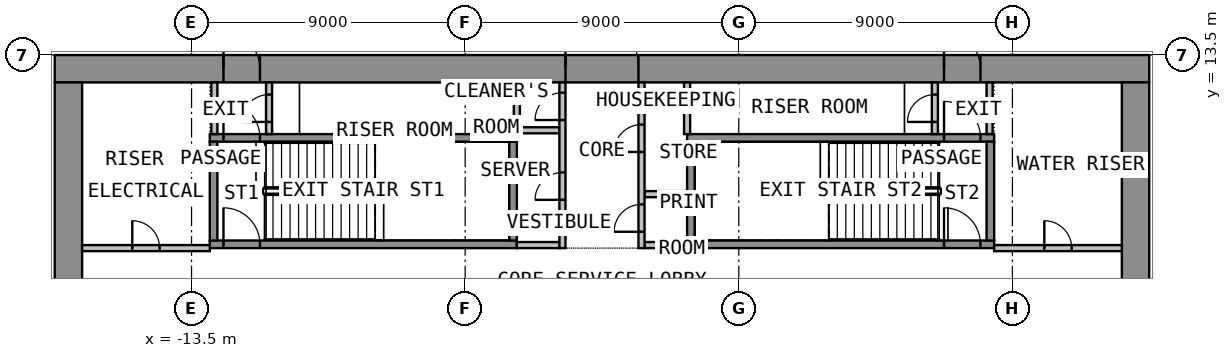
"""IFC4 building model, lengths in metres.
Left out: names, types, materials, properties, quantities, classifications, styles, units other than length and angle.
Written with IfcOpenShell. Run it as: python <this file> out.ifc"""

import sys

from ifc_helpers import new_model, si_unit, direction, frame, frame_2d, origin, place, context, subcontext, project, spatial, rectangle, extrude, element, fill, save


model = new_model("IFC4")
c1 = context("Model", 3, precision=1e-05, world=origin(), true_north=direction((0.0, 1.0)))
c2 = subcontext(c1, "Body", "Model", "MODEL_VIEW")
j1 = project(units=[si_unit("LENGTHUNIT", "METRE"), si_unit("PLANEANGLEUNIT", "RADIAN")], contexts=[c1])
p1 = place(None, origin())
s1 = spatial("IfcSite", under=j1, at=p1, CompositionType="ELEMENT")
p2 = place(p1, origin())
s2 = spatial("IfcBuilding", under=s1, at=p2, CompositionType="ELEMENT")
p3 = place(p2, frame((0.0, 0.0, 10.8)))
s3 = spatial("IfcBuildingStorey", under=s2, at=p3, CompositionType="ELEMENT", Elevation=10.8)
p4 = place(p3, frame((-18.0, 13.05, 0.0), z_axis=(0.0, 0.0, 1.0), x_axis=(1.0, 0.0, 0.0)))
e1 = element("IfcWall", 1, at=p4, inside=s3, PredefinedType="SHEAR", context=c2, shape_type="SweptSolid", body=[
    extrude(rectangle(XDim=36.0, YDim=0.9, at=frame_2d((18.0, 0.0))), origin(), (0.0, 0.0, 1.0), 4.4),
])
p5 = place(p4, frame((16.8, 0.0, 0.0)))
e2 = element("IfcOpeningElement", 2, at=p5, cuts=e1, PredefinedType="OPENING", context=c2, shape_type="SweptSolid", body=[
    extrude(rectangle(XDim=2.4, YDim=2.1, at=frame_2d((1.2, 1.05))), frame((0.0, 0.46, 0.0), z_axis=(0.0, -1.0, 0.0), x_axis=(1.0, 0.0, 0.0)), (0.0, 0.0, 1.0), 0.92),
])
p6 = place(p4, frame((5.55, 0.0, 0.0)))
e3 = element("IfcOpeningElement", 3, at=p6, cuts=e1, PredefinedType="OPENING", context=c2, shape_type="SweptSolid", body=[
    extrude(rectangle(XDim=1.2, YDim=2.1, at=frame_2d((0.6, 1.05))), frame((0.0, 0.46, 0.0), z_axis=(0.0, -1.0, 0.0), x_axis=(1.0, 0.0, 0.0)), (0.0, 0.0, 1.0), 0.92),
])
p7 = place(p4, frame((29.25, 0.0, 0.0)))
e4 = element("IfcOpeningElement", 4, at=p7, cuts=e1, PredefinedType="OPENING", context=c2, shape_type="SweptSolid", body=[
    extrude(rectangle(XDim=1.2, YDim=2.1, at=frame_2d((0.6, 1.05))), frame((0.0, 0.46, 0.0), z_axis=(0.0, -1.0, 0.0), x_axis=(1.0, 0.0, 0.0)), (0.0, 0.0, 1.0), 0.92),
])
p8 = place(p3, frame((-17.55, -12.6, 0.0), z_axis=(0.0, 0.0, 1.0), x_axis=(0.0, 1.0, 0.0)))
e5 = element("IfcWall", 5, at=p8, inside=s3, PredefinedType="SHEAR", context=c2, shape_type="SweptSolid", body=[
    extrude(rectangle(XDim=25.2, YDim=0.9, at=frame_2d((12.6, 0.0))), origin(), (0.0, 0.0, 1.0), 4.4),
])
p9 = place(p8, frame((11.4, 0.0, 0.0)))
e6 = element("IfcOpeningElement", 6, at=p9, cuts=e5, PredefinedType="OPENING", context=c2, shape_type="SweptSolid", body=[
    extrude(rectangle(XDim=2.4, YDim=2.1, at=frame_2d((1.2, 1.05))), frame((0.0, 0.46, 0.0), z_axis=(0.0, -1.0, 0.0), x_axis=(1.0, 0.0, 0.0)), (0.0, 0.0, 1.0), 0.92),
])
p10 = place(p3, frame((17.55, -12.6, 0.0), z_axis=(0.0, 0.0, 1.0), x_axis=(0.0, 1.0, 0.0)))
e7 = element("IfcWall", 7, at=p10, inside=s3, PredefinedType="SHEAR", context=c2, shape_type="SweptSolid", body=[
    extrude(rectangle(XDim=25.2, YDim=0.9, at=frame_2d((12.6, 0.0))), origin(), (0.0, 0.0, 1.0), 4.4),
])
p11 = place(p10, frame((11.4, 0.0, 0.0)))
e8 = element("IfcOpeningElement", 8, at=p11, cuts=e7, PredefinedType="OPENING", context=c2, shape_type="SweptSolid", body=[
    extrude(rectangle(XDim=2.4, YDim=2.1, at=frame_2d((1.2, 1.05))), frame((0.0, 0.46, 0.0), z_axis=(0.0, -1.0, 0.0), x_axis=(1.0, 0.0, 0.0)), (0.0, 0.0, 1.0), 0.92),
])
p12 = place(p3, frame((-12.9, 7.275, 0.0), z_axis=(0.0, 0.0, 1.0), x_axis=(1.0, 0.0, 0.0)))
e9 = element("IfcWall", 9, at=p12, inside=s3, PredefinedType="SHEAR", context=c2, shape_type="SweptSolid", body=[
    extrude(rectangle(XDim=10.1, YDim=0.25, at=frame_2d((5.05, 0.0))), origin(), (0.0, 0.0, 1.0), 4.4),
])
p13 = place(p12, frame((0.45, 0.0, 0.0)))
e10 = element("IfcOpeningElement", 10, at=p13, cuts=e9, PredefinedType="OPENING", context=c2, shape_type="SweptSolid", body=[
    extrude(rectangle(XDim=1.2, YDim=2.1, at=frame_2d((0.6, 1.05))), frame((0.0, 0.135, 0.0), z_axis=(0.0, -1.0, 0.0), x_axis=(1.0, 0.0, 0.0)), (0.0, 0.0, 1.0), 0.27),
])
p14 = place(p3, frame((-12.9, 10.775, 0.0), z_axis=(0.0, 0.0, 1.0), x_axis=(1.0, 0.0, 0.0)))
e11 = element("IfcWall", 11, at=p14, inside=s3, PredefinedType="SHEAR", context=c2, shape_type="SweptSolid", body=[
    extrude(rectangle(XDim=10.1, YDim=0.25, at=frame_2d((5.05, 0.0))), origin(), (0.0, 0.0, 1.0), 4.4),
])
p15 = place(p14, frame((0.45, 0.0, 0.0)))
e12 = element("IfcOpeningElement", 12, at=p15, cuts=e11, PredefinedType="OPENING", context=c2, shape_type="SweptSolid", body=[
    extrude(rectangle(XDim=1.2, YDim=2.1, at=frame_2d((0.6, 1.05))), frame((0.0, 0.135, 0.0), z_axis=(0.0, -1.0, 0.0), x_axis=(1.0, 0.0, 0.0)), (0.0, 0.0, 1.0), 0.27),
])
for number, where, z_axis, x_axis in (
    (13, (-12.775, 7.4, 0.0), (0.0, 0.0, 1.0), (0.0, 1.0, 0.0)),
    (14, (-2.925, 7.4, 0.0), (0.0, 0.0, 1.0), (0.0, 1.0, 0.0)),
):
    element("IfcWall", number, at=place(p3, frame(where, z_axis=z_axis, x_axis=x_axis)), inside=s3, PredefinedType="SHEAR", context=c2, shape_type="SweptSolid", body=[
        extrude(rectangle(XDim=3.25, YDim=0.25, at=frame_2d((1.625, 0.0))), origin(), (0.0, 0.0, 1.0), 4.4),
    ])
p16 = place(p3, frame((2.8, 7.275, 0.0), z_axis=(0.0, 0.0, 1.0), x_axis=(1.0, 0.0, 0.0)))
e15 = element("IfcWall", 15, at=p16, inside=s3, PredefinedType="SHEAR", context=c2, shape_type="SweptSolid", body=[
    extrude(rectangle(XDim=10.1, YDim=0.25, at=frame_2d((5.05, 0.0))), origin(), (0.0, 0.0, 1.0), 4.4),
])
p17 = place(p16, frame((8.45, 0.0, 0.0)))
e16 = element("IfcOpeningElement", 16, at=p17, cuts=e15, PredefinedType="OPENING", context=c2, shape_type="SweptSolid", body=[
    extrude(rectangle(XDim=1.2, YDim=2.1, at=frame_2d((0.6, 1.05))), frame((0.0, 0.135, 0.0), z_axis=(0.0, -1.0, 0.0), x_axis=(1.0, 0.0, 0.0)), (0.0, 0.0, 1.0), 0.27),
])
p18 = place(p3, frame((2.8, 10.775, 0.0), z_axis=(0.0, 0.0, 1.0), x_axis=(1.0, 0.0, 0.0)))
e17 = element("IfcWall", 17, at=p18, inside=s3, PredefinedType="SHEAR", context=c2, shape_type="SweptSolid", body=[
    extrude(rectangle(XDim=10.1, YDim=0.25, at=frame_2d((5.05, 0.0))), origin(), (0.0, 0.0, 1.0), 4.4),
])
p19 = place(p18, frame((8.45, 0.0, 0.0)))
e18 = element("IfcOpeningElement", 18, at=p19, cuts=e17, PredefinedType="OPENING", context=c2, shape_type="SweptSolid", body=[
    extrude(rectangle(XDim=1.2, YDim=2.1, at=frame_2d((0.6, 1.05))), frame((0.0, 0.135, 0.0), z_axis=(0.0, -1.0, 0.0), x_axis=(1.0, 0.0, 0.0)), (0.0, 0.0, 1.0), 0.27),
])
for number, where, z_axis, x_axis in (
    (19, (2.925, 7.4, 0.0), (0.0, 0.0, 1.0), (0.0, 1.0, 0.0)),
    (20, (12.775, 7.4, 0.0), (0.0, 0.0, 1.0), (0.0, 1.0, 0.0)),
):
    element("IfcWall", number, at=place(p3, frame(where, z_axis=z_axis, x_axis=x_axis)), inside=s3, PredefinedType="SHEAR", context=c2, shape_type="SweptSolid", body=[
        extrude(rectangle(XDim=3.25, YDim=0.25, at=frame_2d((1.625, 0.0))), origin(), (0.0, 0.0, 1.0), 4.4),
    ])
for number, where, z_axis, x_axis in (
    (21, (-2.8, 7.25, 0.0), (0.0, 0.0, 1.0), (1.0, 0.0, 0.0)),
    (22, (-2.8, 11.025, 0.0), (0.0, 0.0, 1.0), (1.0, 0.0, 0.0)),
    (23, (1.4, 7.25, 0.0), (0.0, 0.0, 1.0), (1.0, 0.0, 0.0)),
    (24, (1.4, 8.925, 0.0), (0.0, 0.0, 1.0), (1.0, 0.0, 0.0)),
):
    element("IfcWall", number, at=place(p3, frame(where, z_axis=z_axis, x_axis=x_axis)), inside=s3, PredefinedType="PARTITIONING", context=c2, shape_type="SweptSolid", body=[
        extrude(rectangle(XDim=1.4, YDim=0.2, at=frame_2d((0.7, 0.0))), origin(), (0.0, 0.0, 1.0), 4.4),
    ])
p20 = place(p3, frame((-1.3, 7.15, 0.0), z_axis=(0.0, 0.0, 1.0), x_axis=(0.0, 1.0, 0.0)))
e25 = element("IfcWall", 25, at=p20, inside=s3, PredefinedType="PARTITIONING", context=c2, shape_type="SweptSolid", body=[
    extrude(rectangle(XDim=5.45, YDim=0.2, at=frame_2d((2.725, 0.0))), origin(), (0.0, 0.0, 1.0), 4.4),
])
p21 = place(p20, frame((1.587, 0.0, 0.0)))
e26 = element("IfcOpeningElement", 26, at=p21, cuts=e25, PredefinedType="OPENING", context=c2, shape_type="SweptSolid", body=[
    extrude(rectangle(XDim=0.9, YDim=2.1, at=frame_2d((0.45, 1.05))), frame((0.0, 0.11, 0.0), z_axis=(0.0, -1.0, 0.0), x_axis=(1.0, 0.0, 0.0)), (0.0, 0.0, 1.0), 0.22),
])
p22 = place(p20, frame((4.212, 0.0, 0.0)))
e27 = element("IfcOpeningElement", 27, at=p22, cuts=e25, PredefinedType="OPENING", context=c2, shape_type="SweptSolid", body=[
    extrude(rectangle(XDim=0.9, YDim=2.1, at=frame_2d((0.45, 1.05))), frame((0.0, 0.11, 0.0), z_axis=(0.0, -1.0, 0.0), x_axis=(1.0, 0.0, 0.0)), (0.0, 0.0, 1.0), 0.22),
])
p23 = place(p3, frame((1.3, 7.15, 0.0), z_axis=(0.0, 0.0, 1.0), x_axis=(0.0, 1.0, 0.0)))
e28 = element("IfcWall", 28, at=p23, inside=s3, PredefinedType="PARTITIONING", context=c2, shape_type="SweptSolid", body=[
    extrude(rectangle(XDim=5.45, YDim=0.2, at=frame_2d((2.725, 0.0))), origin(), (0.0, 0.0, 1.0), 4.4),
])
p24 = place(p23, frame((0.538, 0.0, 0.0)))
e29 = element("IfcOpeningElement", 29, at=p24, cuts=e28, PredefinedType="OPENING", context=c2, shape_type="SweptSolid", body=[
    extrude(rectangle(XDim=0.9, YDim=2.1, at=frame_2d((0.45, 1.05))), frame((0.0, 0.11, 0.0), z_axis=(0.0, -1.0, 0.0), x_axis=(1.0, 0.0, 0.0)), (0.0, 0.0, 1.0), 0.22),
])
p25 = place(p23, frame((3.163, 0.0, 0.0)))
e30 = element("IfcOpeningElement", 30, at=p25, cuts=e28, PredefinedType="OPENING", context=c2, shape_type="SweptSolid", body=[
    extrude(rectangle(XDim=0.9, YDim=2.1, at=frame_2d((0.45, 1.05))), frame((0.0, 0.11, 0.0), z_axis=(0.0, -1.0, 0.0), x_axis=(1.0, 0.0, 0.0)), (0.0, 0.0, 1.0), 0.22),
])
p26 = place(p3, frame((-12.75, 10.9, 0.0), z_axis=(0.0, 0.0, 1.0), x_axis=(0.0, 1.0, 0.0)))
e31 = element("IfcWall", 31, at=p26, inside=s3, PredefinedType="PARTITIONING", context=c2, shape_type="SweptSolid", body=[
    extrude(rectangle(XDim=1.7, YDim=0.2, at=frame_2d((0.85, 0.0))), origin(), (0.0, 0.0, 1.0), 4.4),
])
p27 = place(p3, frame((-10.95, 10.9, 0.0), z_axis=(0.0, 0.0, 1.0), x_axis=(0.0, 1.0, 0.0)))
e32 = element("IfcWall", 32, at=p27, inside=s3, PredefinedType="PARTITIONING", context=c2, shape_type="SweptSolid", body=[
    extrude(rectangle(XDim=1.7, YDim=0.2, at=frame_2d((0.85, 0.0))), origin(), (0.0, 0.0, 1.0), 4.4),
])
p28 = place(p27, frame((0.4, 0.0, 0.0)))
e33 = element("IfcOpeningElement", 33, at=p28, cuts=e32, PredefinedType="OPENING", context=c2, shape_type="SweptSolid", body=[
    extrude(rectangle(XDim=0.9, YDim=2.1, at=frame_2d((0.45, 1.05))), frame((0.0, 0.11, 0.0), z_axis=(0.0, -1.0, 0.0), x_axis=(1.0, 0.0, 0.0)), (0.0, 0.0, 1.0), 0.22),
])
p29 = place(p3, frame((12.75, 10.9, 0.0), z_axis=(0.0, 0.0, 1.0), x_axis=(0.0, 1.0, 0.0)))
e34 = element("IfcWall", 34, at=p29, inside=s3, PredefinedType="PARTITIONING", context=c2, shape_type="SweptSolid", body=[
    extrude(rectangle(XDim=1.7, YDim=0.2, at=frame_2d((0.85, 0.0))), origin(), (0.0, 0.0, 1.0), 4.4),
])
p30 = place(p3, frame((10.95, 10.9, 0.0), z_axis=(0.0, 0.0, 1.0), x_axis=(0.0, 1.0, 0.0)))
e35 = element("IfcWall", 35, at=p30, inside=s3, PredefinedType="PARTITIONING", context=c2, shape_type="SweptSolid", body=[
    extrude(rectangle(XDim=1.7, YDim=0.2, at=frame_2d((0.85, 0.0))), origin(), (0.0, 0.0, 1.0), 4.4),
])
p31 = place(p30, frame((0.4, 0.0, 0.0)))
e36 = element("IfcOpeningElement", 36, at=p31, cuts=e35, PredefinedType="OPENING", context=c2, shape_type="SweptSolid", body=[
    extrude(rectangle(XDim=0.9, YDim=2.1, at=frame_2d((0.45, 1.05))), frame((0.0, 0.11, 0.0), z_axis=(0.0, -1.0, 0.0), x_axis=(1.0, 0.0, 0.0)), (0.0, 0.0, 1.0), 0.22),
])
p32 = place(p3, frame((-17.1, 7.15, 0.0), z_axis=(0.0, 0.0, 1.0), x_axis=(1.0, 0.0, 0.0)))
e37 = element("IfcWall", 37, at=p32, inside=s3, PredefinedType="PARTITIONING", context=c2, shape_type="SweptSolid", body=[
    extrude(rectangle(XDim=4.2, YDim=0.2, at=frame_2d((2.1, 0.0))), origin(), (0.0, 0.0, 1.0), 4.4),
])
p33 = place(p32, frame((1.65, 0.0, 0.0)))
e38 = element("IfcOpeningElement", 38, at=p33, cuts=e37, PredefinedType="OPENING", context=c2, shape_type="SweptSolid", body=[
    extrude(rectangle(XDim=0.9, YDim=2.1, at=frame_2d((0.45, 1.05))), frame((0.0, 0.11, 0.0), z_axis=(0.0, -1.0, 0.0), x_axis=(1.0, 0.0, 0.0)), (0.0, 0.0, 1.0), 0.22),
])
p34 = place(p3, frame((12.9, 7.15, 0.0), z_axis=(0.0, 0.0, 1.0), x_axis=(1.0, 0.0, 0.0)))
e39 = element("IfcWall", 39, at=p34, inside=s3, PredefinedType="PARTITIONING", context=c2, shape_type="SweptSolid", body=[
    extrude(rectangle(XDim=4.2, YDim=0.2, at=frame_2d((2.1, 0.0))), origin(), (0.0, 0.0, 1.0), 4.4),
])
p35 = place(p34, frame((1.65, 0.0, 0.0)))
e40 = element("IfcOpeningElement", 40, at=p35, cuts=e39, PredefinedType="OPENING", context=c2, shape_type="SweptSolid", body=[
    extrude(rectangle(XDim=0.9, YDim=2.1, at=frame_2d((0.45, 1.05))), frame((0.0, 0.11, 0.0), z_axis=(0.0, -1.0, 0.0), x_axis=(1.0, 0.0, 0.0)), (0.0, 0.0, 1.0), 0.22),
])
p36 = place(p3, frame((-2.8, 11.126, 0.0), z_axis=(0.0, 0.0, 1.0), x_axis=(0.0, 1.0, 0.0)))
e41 = element("IfcWall", 41, at=p36, inside=s3, PredefinedType="PARTITIONING", context=c2, shape_type="SweptSolid", body=[
    extrude(rectangle(XDim=1.473, YDim=0.2, at=frame_2d((0.737, 0.0))), origin(), (0.0, 0.0, 1.0), 4.4),
])
p37 = place(p3, frame((2.8, 12.599, 0.0), z_axis=(0.0, 0.0, 1.0), x_axis=(0.0, -1.0, 0.0)))
e42 = element("IfcWall", 42, at=p37, inside=s3, PredefinedType="PARTITIONING", context=c2, shape_type="SweptSolid", body=[
    extrude(rectangle(XDim=1.698, YDim=0.2, at=frame_2d((0.849, 0.0))), origin(), (0.0, 0.0, 1.0), 4.4),
])
p38 = place(p5, origin())
e43 = element("IfcDoor", 43, at=p38, inside=s3, OperationType="DOUBLE_DOOR_DOUBLE_SWING", PredefinedType="DOOR", context=c2, shape_type="SweptSolid", body=[
    extrude(rectangle(XDim=2.4, YDim=2.1, at=frame_2d((1.2, 1.05))), frame((0.0, 0.025, 0.0), z_axis=(0.0, -1.0, 0.0), x_axis=(1.0, 0.0, 0.0)), (0.0, 0.0, 1.0), 0.05),
])
fill(e2, e43)
p39 = place(p6, origin())
e44 = element("IfcDoor", 44, at=p39, inside=s3, OperationType="SINGLE_SWING_RIGHT", PredefinedType="DOOR", context=c2, shape_type="SweptSolid", body=[
    extrude(rectangle(XDim=1.2, YDim=2.1, at=frame_2d((0.6, 1.05))), frame((0.0, 0.025, 0.0), z_axis=(0.0, -1.0, 0.0), x_axis=(1.0, 0.0, 0.0)), (0.0, 0.0, 1.0), 0.05),
])
fill(e3, e44)
p40 = place(p7, origin())
e45 = element("IfcDoor", 45, at=p40, inside=s3, OperationType="SINGLE_SWING_RIGHT", PredefinedType="DOOR", context=c2, shape_type="SweptSolid", body=[
    extrude(rectangle(XDim=1.2, YDim=2.1, at=frame_2d((0.6, 1.05))), frame((0.0, 0.025, 0.0), z_axis=(0.0, -1.0, 0.0), x_axis=(1.0, 0.0, 0.0)), (0.0, 0.0, 1.0), 0.05),
])
fill(e4, e45)
p41 = place(p13, origin())
e46 = element("IfcDoor", 46, at=p41, inside=s3, OperationType="SINGLE_SWING_LEFT", PredefinedType="DOOR", context=c2, shape_type="SweptSolid", body=[
    extrude(rectangle(XDim=1.2, YDim=2.1, at=frame_2d((0.6, 1.05))), frame((0.0, 0.025, 0.0), z_axis=(0.0, -1.0, 0.0), x_axis=(1.0, 0.0, 0.0)), (0.0, 0.0, 1.0), 0.05),
])
fill(e10, e46)
p42 = place(p17, origin())
e47 = element("IfcDoor", 47, at=p42, inside=s3, OperationType="SINGLE_SWING_LEFT", PredefinedType="DOOR", context=c2, shape_type="SweptSolid", body=[
    extrude(rectangle(XDim=1.2, YDim=2.1, at=frame_2d((0.6, 1.05))), frame((0.0, 0.025, 0.0), z_axis=(0.0, -1.0, 0.0), x_axis=(1.0, 0.0, 0.0)), (0.0, 0.0, 1.0), 0.05),
])
fill(e16, e47)
p43 = place(p21, origin())
e48 = element("IfcDoor", 48, at=p43, inside=s3, OperationType="SINGLE_SWING_LEFT", PredefinedType="DOOR", context=c2, shape_type="SweptSolid", body=[
    extrude(rectangle(XDim=0.9, YDim=2.1, at=frame_2d((0.45, 1.05))), frame((0.0, 0.025, 0.0), z_axis=(0.0, -1.0, 0.0), x_axis=(1.0, 0.0, 0.0)), (0.0, 0.0, 1.0), 0.05),
])
fill(e26, e48)
p44 = place(p22, origin())
e49 = element("IfcDoor", 49, at=p44, inside=s3, OperationType="SINGLE_SWING_LEFT", PredefinedType="DOOR", context=c2, shape_type="SweptSolid", body=[
    extrude(rectangle(XDim=0.9, YDim=2.1, at=frame_2d((0.45, 1.05))), frame((0.0, 0.025, 0.0), z_axis=(0.0, -1.0, 0.0), x_axis=(1.0, 0.0, 0.0)), (0.0, 0.0, 1.0), 0.05),
])
fill(e27, e49)
p45 = place(p24, origin())
e50 = element("IfcDoor", 50, at=p45, inside=s3, OperationType="SINGLE_SWING_LEFT", PredefinedType="DOOR", context=c2, shape_type="SweptSolid", body=[
    extrude(rectangle(XDim=0.9, YDim=2.1, at=frame_2d((0.45, 1.05))), frame((0.0, 0.025, 0.0), z_axis=(0.0, -1.0, 0.0), x_axis=(1.0, 0.0, 0.0)), (0.0, 0.0, 1.0), 0.05),
])
fill(e29, e50)
p46 = place(p25, origin())
e51 = element("IfcDoor", 51, at=p46, inside=s3, OperationType="SINGLE_SWING_LEFT", PredefinedType="DOOR", context=c2, shape_type="SweptSolid", body=[
    extrude(rectangle(XDim=0.9, YDim=2.1, at=frame_2d((0.45, 1.05))), frame((0.0, 0.025, 0.0), z_axis=(0.0, -1.0, 0.0), x_axis=(1.0, 0.0, 0.0)), (0.0, 0.0, 1.0), 0.05),
])
fill(e30, e51)
p47 = place(p15, origin())
e52 = element("IfcDoor", 52, at=p47, inside=s3, OperationType="SINGLE_SWING_RIGHT", PredefinedType="DOOR", context=c2, shape_type="SweptSolid", body=[
    extrude(rectangle(XDim=1.2, YDim=2.1, at=frame_2d((0.6, 1.05))), frame((0.0, 0.025, 0.0), z_axis=(0.0, -1.0, 0.0), x_axis=(1.0, 0.0, 0.0)), (0.0, 0.0, 1.0), 0.05),
])
fill(e12, e52)
p48 = place(p28, origin())
e53 = element("IfcDoor", 53, at=p48, inside=s3, OperationType="SINGLE_SWING_LEFT", PredefinedType="DOOR", context=c2, shape_type="SweptSolid", body=[
    extrude(rectangle(XDim=0.9, YDim=2.1, at=frame_2d((0.45, 1.05))), frame((0.0, 0.025, 0.0), z_axis=(0.0, -1.0, 0.0), x_axis=(1.0, 0.0, 0.0)), (0.0, 0.0, 1.0), 0.05),
])
fill(e33, e53)
p49 = place(p19, origin())
e54 = element("IfcDoor", 54, at=p49, inside=s3, OperationType="SINGLE_SWING_RIGHT", PredefinedType="DOOR", context=c2, shape_type="SweptSolid", body=[
    extrude(rectangle(XDim=1.2, YDim=2.1, at=frame_2d((0.6, 1.05))), frame((0.0, 0.025, 0.0), z_axis=(0.0, -1.0, 0.0), x_axis=(1.0, 0.0, 0.0)), (0.0, 0.0, 1.0), 0.05),
])
fill(e18, e54)
p50 = place(p31, origin())
e55 = element("IfcDoor", 55, at=p50, inside=s3, OperationType="SINGLE_SWING_LEFT", PredefinedType="DOOR", context=c2, shape_type="SweptSolid", body=[
    extrude(rectangle(XDim=0.9, YDim=2.1, at=frame_2d((0.45, 1.05))), frame((0.0, 0.025, 0.0), z_axis=(0.0, -1.0, 0.0), x_axis=(1.0, 0.0, 0.0)), (0.0, 0.0, 1.0), 0.05),
])
fill(e36, e55)
p51 = place(p33, origin())
e56 = element("IfcDoor", 56, at=p51, inside=s3, OperationType="SINGLE_SWING_LEFT", PredefinedType="DOOR", context=c2, shape_type="SweptSolid", body=[
    extrude(rectangle(XDim=0.9, YDim=2.1, at=frame_2d((0.45, 1.05))), frame((0.0, 0.025, 0.0), z_axis=(0.0, -1.0, 0.0), x_axis=(1.0, 0.0, 0.0)), (0.0, 0.0, 1.0), 0.05),
])
fill(e38, e56)
p52 = place(p35, origin())
e57 = element("IfcDoor", 57, at=p52, inside=s3, OperationType="SINGLE_SWING_LEFT", PredefinedType="DOOR", context=c2, shape_type="SweptSolid", body=[
    extrude(rectangle(XDim=0.9, YDim=2.1, at=frame_2d((0.45, 1.05))), frame((0.0, 0.025, 0.0), z_axis=(0.0, -1.0, 0.0), x_axis=(1.0, 0.0, 0.0)), (0.0, 0.0, 1.0), 0.05),
])
fill(e40, e57)
save(model, sys.argv[1])
